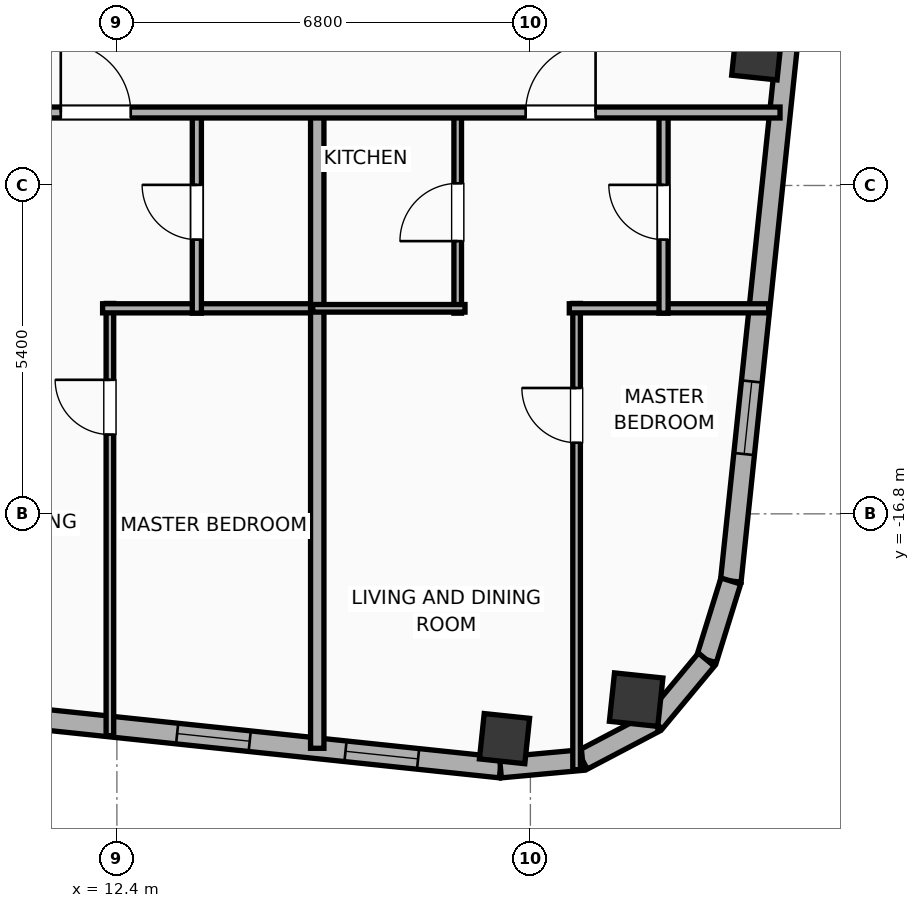
"""IFC4 building model, lengths in metres.
Left out: names, types, materials, properties, quantities, classifications, styles, units other than length and angle.
Written with IfcOpenShell. Run it as: python <this file> out.ifc"""

import sys

from ifc_helpers import new_model, si_unit, direction, frame, frame_2d, origin, origin_2d, place, context, subcontext, project, spatial, rectangle, hollow_rectangle, hollow_circle, extrude, element, fill, save


model = new_model("IFC4")
c1 = context("Model", 3, precision=1e-05, world=origin(), true_north=direction((0.0, 1.0)))
c2 = subcontext(c1, "Body", "Model", "MODEL_VIEW")
j1 = project(units=[si_unit("LENGTHUNIT", "METRE"), si_unit("PLANEANGLEUNIT", "RADIAN")], contexts=[c1])
p1 = place(None, origin())
s1 = spatial("IfcSite", under=j1, at=p1, CompositionType="ELEMENT")
p2 = place(p1, origin())
s2 = spatial("IfcBuilding", under=s1, at=p2, CompositionType="ELEMENT")
p3 = place(p2, frame((0.0, 0.0, 295.1)))
s3 = spatial("IfcBuildingStorey", under=s2, at=p3, CompositionType="ELEMENT", Elevation=295.1)
p4 = place(p3, frame((18.775, -20.497, 0.0), z_axis=(0.0, 0.0, 1.0), x_axis=(0.994521895368, -0.104528463268, 0.0)))
e1 = element("IfcColumn", 1, at=p4, inside=s3, PredefinedType="COLUMN", context=c2, shape_type="SweptSolid", body=[
    extrude(hollow_rectangle(XDim=0.75, YDim=0.75, WallThickness=0.025, at=origin_2d()), origin(), (0.0, 0.0, 1.0), 3.9),
])
p5 = place(p3, frame((20.939, -19.855, 0.0), z_axis=(0.0, 0.0, 1.0), x_axis=(0.994521895368, -0.104528463268, 0.0)))
e2 = element("IfcColumn", 2, at=p5, inside=s3, PredefinedType="COLUMN", context=c2, shape_type="SweptSolid", body=[
    extrude(hollow_circle(Radius=0.4, WallThickness=0.028, at=origin_2d()), origin(), (0.0, 0.0, 1.0), 3.9),
])
p6 = place(p3, frame((22.923, -9.252, 0.0), z_axis=(0.0, 0.0, 1.0), x_axis=(0.994521895368, -0.104528463268, 0.0)))
e3 = element("IfcColumn", 3, at=p6, inside=s3, PredefinedType="COLUMN", context=c2, shape_type="SweptSolid", body=[
    extrude(hollow_rectangle(XDim=0.75, YDim=0.75, WallThickness=0.025, at=origin_2d()), origin(), (0.0, 0.0, 1.0), 3.9),
])
p7 = place(p3, frame((18.708, -20.972, 0.0), z_axis=(0.0, 0.0, 1.0), x_axis=(-0.994521888554, 0.104528528102, 0.0)))
e4 = element("IfcWall", 4, at=p7, inside=s3, PredefinedType="ELEMENTEDWALL", context=c2, shape_type="SweptSolid", body=[
    extrude(rectangle(XDim=46.766, YDim=0.34, at=frame_2d((23.383, 0.0))), origin(), (0.0, 0.0, 1.0), 3.635),
])
p8 = place(p7, frame((23.733, 0.0, 0.65)))
e5 = element("IfcOpeningElement", 5, at=p8, cuts=e4, PredefinedType="OPENING", context=c2, shape_type="SweptSolid", body=[
    extrude(rectangle(XDim=2.6, YDim=2.45, at=frame_2d((1.3, 1.225))), frame((0.0, 0.18, 0.0), z_axis=(0.0, -1.0, 0.0), x_axis=(1.0, 0.0, 0.0)), (0.0, 0.0, 1.0), 0.36),
])
p9 = place(p7, frame((44.402, 0.0, 0.75)))
e6 = element("IfcOpeningElement", 6, at=p9, cuts=e4, PredefinedType="OPENING", context=c2, shape_type="SweptSolid", body=[
    extrude(rectangle(XDim=1.2, YDim=2.05, at=frame_2d((0.6, 1.025))), frame((0.0, 0.18, 0.0), z_axis=(0.0, -1.0, 0.0), x_axis=(1.0, 0.0, 0.0)), (0.0, 0.0, 1.0), 0.36),
])
p10 = place(p7, frame((39.553, 0.0, 0.75)))
e7 = element("IfcOpeningElement", 7, at=p10, cuts=e4, PredefinedType="OPENING", context=c2, shape_type="SweptSolid", body=[
    extrude(rectangle(XDim=1.2, YDim=2.05, at=frame_2d((0.6, 1.025))), frame((0.0, 0.18, 0.0), z_axis=(0.0, -1.0, 0.0), x_axis=(1.0, 0.0, 0.0)), (0.0, 0.0, 1.0), 0.36),
])
p11 = place(p7, frame((42.419, 0.0, 0.75)))
e8 = element("IfcOpeningElement", 8, at=p11, cuts=e4, PredefinedType="OPENING", context=c2, shape_type="SweptSolid", body=[
    extrude(rectangle(XDim=1.2, YDim=2.05, at=frame_2d((0.6, 1.025))), frame((0.0, 0.18, 0.0), z_axis=(0.0, -1.0, 0.0), x_axis=(1.0, 0.0, 0.0)), (0.0, 0.0, 1.0), 0.36),
])
p12 = place(p7, frame((34.933, 0.0, 0.75)))
e9 = element("IfcOpeningElement", 9, at=p12, cuts=e4, PredefinedType="OPENING", context=c2, shape_type="SweptSolid", body=[
    extrude(rectangle(XDim=1.2, YDim=2.05, at=frame_2d((0.6, 1.025))), frame((0.0, 0.18, 0.0), z_axis=(0.0, -1.0, 0.0), x_axis=(1.0, 0.0, 0.0)), (0.0, 0.0, 1.0), 0.36),
])
p13 = place(p7, frame((28.692, 0.0, 0.75)))
e10 = element("IfcOpeningElement", 10, at=p13, cuts=e4, PredefinedType="OPENING", context=c2, shape_type="SweptSolid", body=[
    extrude(rectangle(XDim=1.2, YDim=2.05, at=frame_2d((0.6, 1.025))), frame((0.0, 0.18, 0.0), z_axis=(0.0, -1.0, 0.0), x_axis=(1.0, 0.0, 0.0)), (0.0, 0.0, 1.0), 0.36),
])
p14 = place(p7, frame((30.957, 0.0, 0.75)))
e11 = element("IfcOpeningElement", 11, at=p14, cuts=e4, PredefinedType="OPENING", context=c2, shape_type="SweptSolid", body=[
    extrude(rectangle(XDim=1.2, YDim=2.05, at=frame_2d((0.6, 1.025))), frame((0.0, 0.18, 0.0), z_axis=(0.0, -1.0, 0.0), x_axis=(1.0, 0.0, 0.0)), (0.0, 0.0, 1.0), 0.36),
])
p15 = place(p7, frame((7.495, 0.0, 0.75)))
e12 = element("IfcOpeningElement", 12, at=p15, cuts=e4, PredefinedType="OPENING", context=c2, shape_type="SweptSolid", body=[
    extrude(rectangle(XDim=1.2, YDim=2.05, at=frame_2d((0.6, 1.025))), frame((0.0, 0.18, 0.0), z_axis=(0.0, -1.0, 0.0), x_axis=(1.0, 0.0, 0.0)), (0.0, 0.0, 1.0), 0.36),
])
p16 = place(p7, frame((4.146, 0.0, 0.75)))
e13 = element("IfcOpeningElement", 13, at=p16, cuts=e4, PredefinedType="OPENING", context=c2, shape_type="SweptSolid", body=[
    extrude(rectangle(XDim=1.2, YDim=2.05, at=frame_2d((0.6, 1.025))), frame((0.0, 0.18, 0.0), z_axis=(0.0, -1.0, 0.0), x_axis=(1.0, 0.0, 0.0)), (0.0, 0.0, 1.0), 0.36),
])
p17 = place(p7, frame((1.362, 0.0, 0.75)))
e14 = element("IfcOpeningElement", 14, at=p17, cuts=e4, PredefinedType="OPENING", context=c2, shape_type="SweptSolid", body=[
    extrude(rectangle(XDim=1.2, YDim=2.05, at=frame_2d((0.6, 1.025))), frame((0.0, 0.18, 0.0), z_axis=(0.0, -1.0, 0.0), x_axis=(1.0, 0.0, 0.0)), (0.0, 0.0, 1.0), 0.36),
])
p18 = place(p7, frame((20.254, 0.0, 0.75)))
e15 = element("IfcOpeningElement", 15, at=p18, cuts=e4, PredefinedType="OPENING", context=c2, shape_type="SweptSolid", body=[
    extrude(rectangle(XDim=1.2, YDim=2.05, at=frame_2d((0.6, 1.025))), frame((0.0, 0.18, 0.0), z_axis=(0.0, -1.0, 0.0), x_axis=(1.0, 0.0, 0.0)), (0.0, 0.0, 1.0), 0.36),
])
p19 = place(p7, frame((16.172, 0.0, 0.75)))
e16 = element("IfcOpeningElement", 16, at=p19, cuts=e4, PredefinedType="OPENING", context=c2, shape_type="SweptSolid", body=[
    extrude(rectangle(XDim=1.2, YDim=2.05, at=frame_2d((0.6, 1.025))), frame((0.0, 0.18, 0.0), z_axis=(0.0, -1.0, 0.0), x_axis=(1.0, 0.0, 0.0)), (0.0, 0.0, 1.0), 0.36),
])
p20 = place(p7, frame((12.11, 0.0, 0.75)))
e17 = element("IfcOpeningElement", 17, at=p20, cuts=e4, PredefinedType="OPENING", context=c2, shape_type="SweptSolid", body=[
    extrude(rectangle(XDim=1.2, YDim=2.05, at=frame_2d((0.6, 1.025))), frame((0.0, 0.18, 0.0), z_axis=(0.0, -1.0, 0.0), x_axis=(1.0, 0.0, 0.0)), (0.0, 0.0, 1.0), 0.36),
])
p21 = place(p3, frame((25.67, 12.296, 0.0), z_axis=(0.0, 0.0, 1.0), x_axis=(-0.104533282919, -0.994521388791, 0.0)))
e18 = element("IfcWall", 18, at=p21, inside=s3, PredefinedType="ELEMENTEDWALL", context=c2, shape_type="SweptSolid", body=[
    extrude(rectangle(XDim=30.366, YDim=0.34, at=frame_2d((15.183, 0.0))), origin(), (0.0, 0.0, 1.0), 3.635),
])
p22 = place(p21, frame((5.442, 0.0, 0.65)))
e19 = element("IfcOpeningElement", 19, at=p22, cuts=e18, PredefinedType="OPENING", context=c2, shape_type="SweptSolid", body=[
    extrude(rectangle(XDim=2.6, YDim=2.45, at=frame_2d((1.3, 1.225))), frame((0.0, 0.18, 0.0), z_axis=(0.0, -1.0, 0.0), x_axis=(1.0, 0.0, 0.0)), (0.0, 0.0, 1.0), 0.36),
])
p23 = place(p21, frame((27.067, 0.0, 0.75)))
e20 = element("IfcOpeningElement", 20, at=p23, cuts=e18, PredefinedType="OPENING", context=c2, shape_type="SweptSolid", body=[
    extrude(rectangle(XDim=1.2, YDim=2.05, at=frame_2d((0.6, 1.025))), frame((0.0, 0.18, 0.0), z_axis=(0.0, -1.0, 0.0), x_axis=(1.0, 0.0, 0.0)), (0.0, 0.0, 1.0), 0.36),
])
p24 = place(p21, frame((17.879, 0.0, 0.75)))
e21 = element("IfcOpeningElement", 21, at=p24, cuts=e18, PredefinedType="OPENING", context=c2, shape_type="SweptSolid", body=[
    extrude(rectangle(XDim=1.2, YDim=2.05, at=frame_2d((0.6, 1.025))), frame((0.0, 0.18, 0.0), z_axis=(0.0, -1.0, 0.0), x_axis=(1.0, 0.0, 0.0)), (0.0, 0.0, 1.0), 0.36),
])
p25 = place(p3, frame((22.496, -17.905, 0.0), z_axis=(0.0, 0.0, 1.0), x_axis=(-0.296416228123, -0.955058856671, 0.0)))
e22 = element("IfcWall", 22, at=p25, inside=s3, PredefinedType="ELEMENTEDWALL", context=c2, shape_type="SweptSolid", body=[
    extrude(rectangle(XDim=1.354, YDim=0.34, at=frame_2d((0.677, 0.0))), origin(), (0.0, 0.0, 1.0), 3.635),
])
p26 = place(p3, frame((22.094, -19.198, 0.0), z_axis=(0.0, 0.0, 1.0), x_axis=(-0.639501603217, -0.768789762863, 0.0)))
e23 = element("IfcWall", 23, at=p26, inside=s3, PredefinedType="ELEMENTEDWALL", context=c2, shape_type="SweptSolid", body=[
    extrude(rectangle(XDim=1.337, YDim=0.34, at=frame_2d((0.668, 0.0))), origin(), (0.0, 0.0, 1.0), 3.635),
])
p27 = place(p3, frame((21.24, -20.226, 0.0), z_axis=(0.0, 0.0, 1.0), x_axis=(-0.884922182678, -0.465738908193, 0.0)))
e24 = element("IfcWall", 24, at=p27, inside=s3, PredefinedType="ELEMENTEDWALL", context=c2, shape_type="SweptSolid", body=[
    extrude(rectangle(XDim=1.337, YDim=0.34, at=frame_2d((0.668, 0.0))), origin(), (0.0, 0.0, 1.0), 3.635),
])
p28 = place(p3, frame((20.056, -20.848, 0.0), z_axis=(0.0, 0.0, 1.0), x_axis=(-0.995813013343, -0.091413579172, 0.0)))
e25 = element("IfcWall", 25, at=p28, inside=s3, PredefinedType="ELEMENTEDWALL", context=c2, shape_type="SweptSolid", body=[
    extrude(rectangle(XDim=1.354, YDim=0.34, at=frame_2d((0.677, 0.0))), origin(), (0.0, 0.0, 1.0), 3.635),
])
p29 = place(p3, frame((12.285, -20.448, 0.0), z_axis=(0.0, 0.0, 1.0), x_axis=(0.0, 1.0, 0.0)))
e26 = element("IfcWall", 26, at=p29, inside=s3, PredefinedType="PARTITIONING", context=c2, shape_type="SweptSolid", body=[
    extrude(rectangle(XDim=7.108, YDim=0.125, at=frame_2d((3.554, 0.0))), origin(), (0.0, 0.0, 1.0), 3.635),
])
p30 = place(p29, frame((4.952, 0.0, 0.0)))
e27 = element("IfcOpeningElement", 27, at=p30, cuts=e26, PredefinedType="OPENING", context=c2, shape_type="SweptSolid", body=[
    extrude(rectangle(XDim=0.9, YDim=2.05, at=frame_2d((0.45, 1.025))), frame((0.0, 0.073, 0.0), z_axis=(0.0, -1.0, 0.0), x_axis=(1.0, 0.0, 0.0)), (0.0, 0.0, 1.0), 0.145),
])
p31 = place(p3, frame((12.165, -13.42, 0.0), z_axis=(0.0, 0.0, 1.0), x_axis=(1.0, 0.0, 0.0)))
e28 = element("IfcWall", 28, at=p31, inside=s3, PredefinedType="PLUMBINGWALL", context=c2, shape_type="SweptSolid", body=[
    extrude(rectangle(XDim=3.605, YDim=0.15, at=frame_2d((1.802, 0.0))), origin(), (0.0, 0.0, 1.0), 3.635),
])
p32 = place(p3, frame((13.715, -13.5, 0.0), z_axis=(0.0, 0.0, 1.0), x_axis=(0.0, 1.0, 0.0)))
e29 = element("IfcWall", 29, at=p32, inside=s3, PredefinedType="PLUMBINGWALL", context=c2, shape_type="SweptSolid", body=[
    extrude(rectangle(XDim=3.32, YDim=0.15, at=frame_2d((1.66, 0.0))), origin(), (0.0, 0.0, 1.0), 3.635),
])
p33 = place(p32, frame((1.21, 0.0, 0.0)))
e30 = element("IfcOpeningElement", 30, at=p33, cuts=e29, PredefinedType="OPENING", context=c2, shape_type="SweptSolid", body=[
    extrude(rectangle(XDim=0.9, YDim=2.05, at=frame_2d((0.45, 1.025))), frame((0.0, 0.085, 0.0), z_axis=(0.0, -1.0, 0.0), x_axis=(1.0, 0.0, 0.0)), (0.0, 0.0, 1.0), 0.17),
])
p34 = place(p3, frame((15.695, -20.656, 0.0), z_axis=(0.0, 0.0, 1.0), x_axis=(0.0, 1.0, 0.0)))
e31 = element("IfcWall", 31, at=p34, inside=s3, PredefinedType="PARTITIONING", context=c2, shape_type="SweptSolid", body=[
    extrude(rectangle(XDim=10.535, YDim=0.22, at=frame_2d((5.268, 0.0))), origin(), (0.0, 0.0, 1.0), 3.635),
])
p35 = place(p3, frame((19.96, -21.008, 0.0), z_axis=(0.0, 0.0, 1.0), x_axis=(0.0, 1.0, 0.0)))
e32 = element("IfcWall", 32, at=p35, inside=s3, PredefinedType="PARTITIONING", context=c2, shape_type="SweptSolid", body=[
    extrude(rectangle(XDim=7.668, YDim=0.125, at=frame_2d((3.834, 0.0))), origin(), (0.0, 0.0, 1.0), 3.635),
])
p36 = place(p35, frame((5.377, 0.0, 0.0)))
e33 = element("IfcOpeningElement", 33, at=p36, cuts=e32, PredefinedType="OPENING", context=c2, shape_type="SweptSolid", body=[
    extrude(rectangle(XDim=0.9, YDim=2.05, at=frame_2d((0.45, 1.025))), frame((0.0, 0.073, 0.0), z_axis=(0.0, -1.0, 0.0), x_axis=(1.0, 0.0, 0.0)), (0.0, 0.0, 1.0), 0.145),
])
p37 = place(p3, frame((19.84, -13.42, 0.0), z_axis=(0.0, 0.0, 1.0), x_axis=(1.0, 0.0, 0.0)))
e34 = element("IfcWall", 34, at=p37, inside=s3, PredefinedType="PLUMBINGWALL", context=c2, shape_type="SweptSolid", body=[
    extrude(rectangle(XDim=3.278, YDim=0.15, at=frame_2d((1.639, 0.0))), origin(), (0.0, 0.0, 1.0), 3.635),
])
p38 = place(p3, frame((18.005, -13.5, 0.0), z_axis=(0.0, 0.0, 1.0), x_axis=(0.0, 1.0, 0.0)))
e35 = element("IfcWall", 35, at=p38, inside=s3, PredefinedType="PARTITIONING", context=c2, shape_type="SweptSolid", body=[
    extrude(rectangle(XDim=3.32, YDim=0.125, at=frame_2d((1.66, 0.0))), origin(), (0.0, 0.0, 1.0), 3.635),
])
p39 = place(p38, frame((1.185, 0.0, 0.0)))
e36 = element("IfcOpeningElement", 36, at=p39, cuts=e35, PredefinedType="OPENING", context=c2, shape_type="SweptSolid", body=[
    extrude(rectangle(XDim=0.95, YDim=2.05, at=frame_2d((0.475, 1.025))), frame((0.0, 0.073, 0.0), z_axis=(0.0, -1.0, 0.0), x_axis=(1.0, 0.0, 0.0)), (0.0, 0.0, 1.0), 0.145),
])
p40 = place(p3, frame((15.62, -13.42, 0.0), z_axis=(0.0, 0.0, 1.0), x_axis=(1.0, 0.0, 0.0)))
e37 = element("IfcWall", 37, at=p40, inside=s3, PredefinedType="PARTITIONING", context=c2, shape_type="SweptSolid", body=[
    extrude(rectangle(XDim=2.505, YDim=0.125, at=frame_2d((1.252, 0.0))), origin(), (0.0, 0.0, 1.0), 3.635),
])
p41 = place(p3, frame((21.39, -13.5, 0.0), z_axis=(0.0, 0.0, 1.0), x_axis=(0.0, 1.0, 0.0)))
e38 = element("IfcWall", 38, at=p41, inside=s3, PredefinedType="PLUMBINGWALL", context=c2, shape_type="SweptSolid", body=[
    extrude(rectangle(XDim=3.32, YDim=0.15, at=frame_2d((1.66, 0.0))), origin(), (0.0, 0.0, 1.0), 3.635),
])
p42 = place(p41, frame((1.21, 0.0, 0.0)))
e39 = element("IfcOpeningElement", 39, at=p42, cuts=e38, PredefinedType="OPENING", context=c2, shape_type="SweptSolid", body=[
    extrude(rectangle(XDim=0.9, YDim=2.05, at=frame_2d((0.45, 1.025))), frame((0.0, 0.085, 0.0), z_axis=(0.0, -1.0, 0.0), x_axis=(1.0, 0.0, 0.0)), (0.0, 0.0, 1.0), 0.17),
])
p43 = place(p3, frame((8.08, -10.2, 0.0), z_axis=(0.0, 0.0, 1.0), x_axis=(1.0, 0.0, 0.0)))
e40 = element("IfcWall", 40, at=p43, inside=s3, PredefinedType="PARTITIONING", context=c2, shape_type="SweptSolid", body=[
    extrude(rectangle(XDim=15.226, YDim=0.18, at=frame_2d((7.613, 0.0))), origin(), (0.0, 0.0, 1.0), 3.635),
])
p44 = place(p43, frame((3.397, 0.0, 0.0)))
e41 = element("IfcOpeningElement", 41, at=p44, cuts=e40, PredefinedType="OPENING", context=c2, shape_type="SweptSolid", body=[
    extrude(rectangle(XDim=1.15, YDim=2.05, at=frame_2d((0.575, 1.025))), frame((0.0, 0.1, 0.0), z_axis=(0.0, -1.0, 0.0), x_axis=(1.0, 0.0, 0.0)), (0.0, 0.0, 1.0), 0.2),
])
p45 = place(p43, frame((11.042, 0.0, 0.0)))
e42 = element("IfcOpeningElement", 42, at=p45, cuts=e40, PredefinedType="OPENING", context=c2, shape_type="SweptSolid", body=[
    extrude(rectangle(XDim=1.15, YDim=2.05, at=frame_2d((0.575, 1.025))), frame((0.0, 0.1, 0.0), z_axis=(0.0, -1.0, 0.0), x_axis=(1.0, 0.0, 0.0)), (0.0, 0.0, 1.0), 0.2),
])
p46 = place(p16, origin())
e43 = element("IfcWindow", 43, at=p46, inside=s3, PartitioningType="SINGLE_PANEL", PredefinedType="WINDOW", context=c2, shape_type="SweptSolid", body=[
    extrude(rectangle(XDim=1.2, YDim=2.05, at=frame_2d((0.6, 1.025))), frame((0.0, 0.03, 0.0), z_axis=(0.0, -1.0, 0.0), x_axis=(1.0, 0.0, 0.0)), (0.0, 0.0, 1.0), 0.06),
])
fill(e13, e43)
p47 = place(p17, origin())
e44 = element("IfcWindow", 44, at=p47, inside=s3, PartitioningType="SINGLE_PANEL", PredefinedType="WINDOW", context=c2, shape_type="SweptSolid", body=[
    extrude(rectangle(XDim=1.2, YDim=2.05, at=frame_2d((0.6, 1.025))), frame((0.0, 0.03, 0.0), z_axis=(0.0, -1.0, 0.0), x_axis=(1.0, 0.0, 0.0)), (0.0, 0.0, 1.0), 0.06),
])
fill(e14, e44)
p48 = place(p23, origin())
e45 = element("IfcWindow", 45, at=p48, inside=s3, PartitioningType="SINGLE_PANEL", PredefinedType="WINDOW", context=c2, shape_type="SweptSolid", body=[
    extrude(rectangle(XDim=1.2, YDim=2.05, at=frame_2d((0.6, 1.025))), frame((0.0, 0.03, 0.0), z_axis=(0.0, -1.0, 0.0), x_axis=(1.0, 0.0, 0.0)), (0.0, 0.0, 1.0), 0.06),
])
fill(e20, e45)
p49 = place(p30, origin())
e46 = element("IfcDoor", 46, at=p49, inside=s3, OperationType="SINGLE_SWING_RIGHT", PredefinedType="DOOR", context=c2, shape_type="SweptSolid", body=[
    extrude(rectangle(XDim=0.9, YDim=2.05, at=frame_2d((0.45, 1.025))), frame((0.0, 0.025, 0.0), z_axis=(0.0, -1.0, 0.0), x_axis=(1.0, 0.0, 0.0)), (0.0, 0.0, 1.0), 0.05),
])
fill(e27, e46)
p50 = place(p33, origin())
e47 = element("IfcDoor", 47, at=p50, inside=s3, OperationType="SINGLE_SWING_RIGHT", PredefinedType="DOOR", context=c2, shape_type="SweptSolid", body=[
    extrude(rectangle(XDim=0.9, YDim=2.05, at=frame_2d((0.45, 1.025))), frame((0.0, 0.025, 0.0), z_axis=(0.0, -1.0, 0.0), x_axis=(1.0, 0.0, 0.0)), (0.0, 0.0, 1.0), 0.05),
])
fill(e30, e47)
p51 = place(p36, origin())
e48 = element("IfcDoor", 48, at=p51, inside=s3, OperationType="SINGLE_SWING_RIGHT", PredefinedType="DOOR", context=c2, shape_type="SweptSolid", body=[
    extrude(rectangle(XDim=0.9, YDim=2.05, at=frame_2d((0.45, 1.025))), frame((0.0, 0.025, 0.0), z_axis=(0.0, -1.0, 0.0), x_axis=(1.0, 0.0, 0.0)), (0.0, 0.0, 1.0), 0.05),
])
fill(e33, e48)
p52 = place(p39, origin())
e49 = element("IfcDoor", 49, at=p52, inside=s3, OperationType="SINGLE_SWING_LEFT", PredefinedType="DOOR", context=c2, shape_type="SweptSolid", body=[
    extrude(rectangle(XDim=0.95, YDim=2.05, at=frame_2d((0.475, 1.025))), frame((0.0, 0.025, 0.0), z_axis=(0.0, -1.0, 0.0), x_axis=(1.0, 0.0, 0.0)), (0.0, 0.0, 1.0), 0.05),
])
fill(e36, e49)
p53 = place(p42, origin())
e50 = element("IfcDoor", 50, at=p53, inside=s3, OperationType="SINGLE_SWING_RIGHT", PredefinedType="DOOR", context=c2, shape_type="SweptSolid", body=[
    extrude(rectangle(XDim=0.9, YDim=2.05, at=frame_2d((0.45, 1.025))), frame((0.0, 0.025, 0.0), z_axis=(0.0, -1.0, 0.0), x_axis=(1.0, 0.0, 0.0)), (0.0, 0.0, 1.0), 0.05),
])
fill(e39, e50)
p54 = place(p44, origin())
e51 = element("IfcDoor", 51, at=p54, inside=s3, OperationType="SINGLE_SWING_LEFT", PredefinedType="DOOR", context=c2, shape_type="SweptSolid", body=[
    extrude(rectangle(XDim=1.15, YDim=2.05, at=frame_2d((0.575, 1.025))), frame((0.0, 0.025, 0.0), z_axis=(0.0, -1.0, 0.0), x_axis=(1.0, 0.0, 0.0)), (0.0, 0.0, 1.0), 0.05),
])
fill(e41, e51)
p55 = place(p45, origin())
e52 = element("IfcDoor", 52, at=p55, inside=s3, OperationType="SINGLE_SWING_RIGHT", PredefinedType="DOOR", context=c2, shape_type="SweptSolid", body=[
    extrude(rectangle(XDim=1.15, YDim=2.05, at=frame_2d((0.575, 1.025))), frame((0.0, 0.025, 0.0), z_axis=(0.0, -1.0, 0.0), x_axis=(1.0, 0.0, 0.0)), (0.0, 0.0, 1.0), 0.05),
])
fill(e42, e52)
save(model, sys.argv[1])
